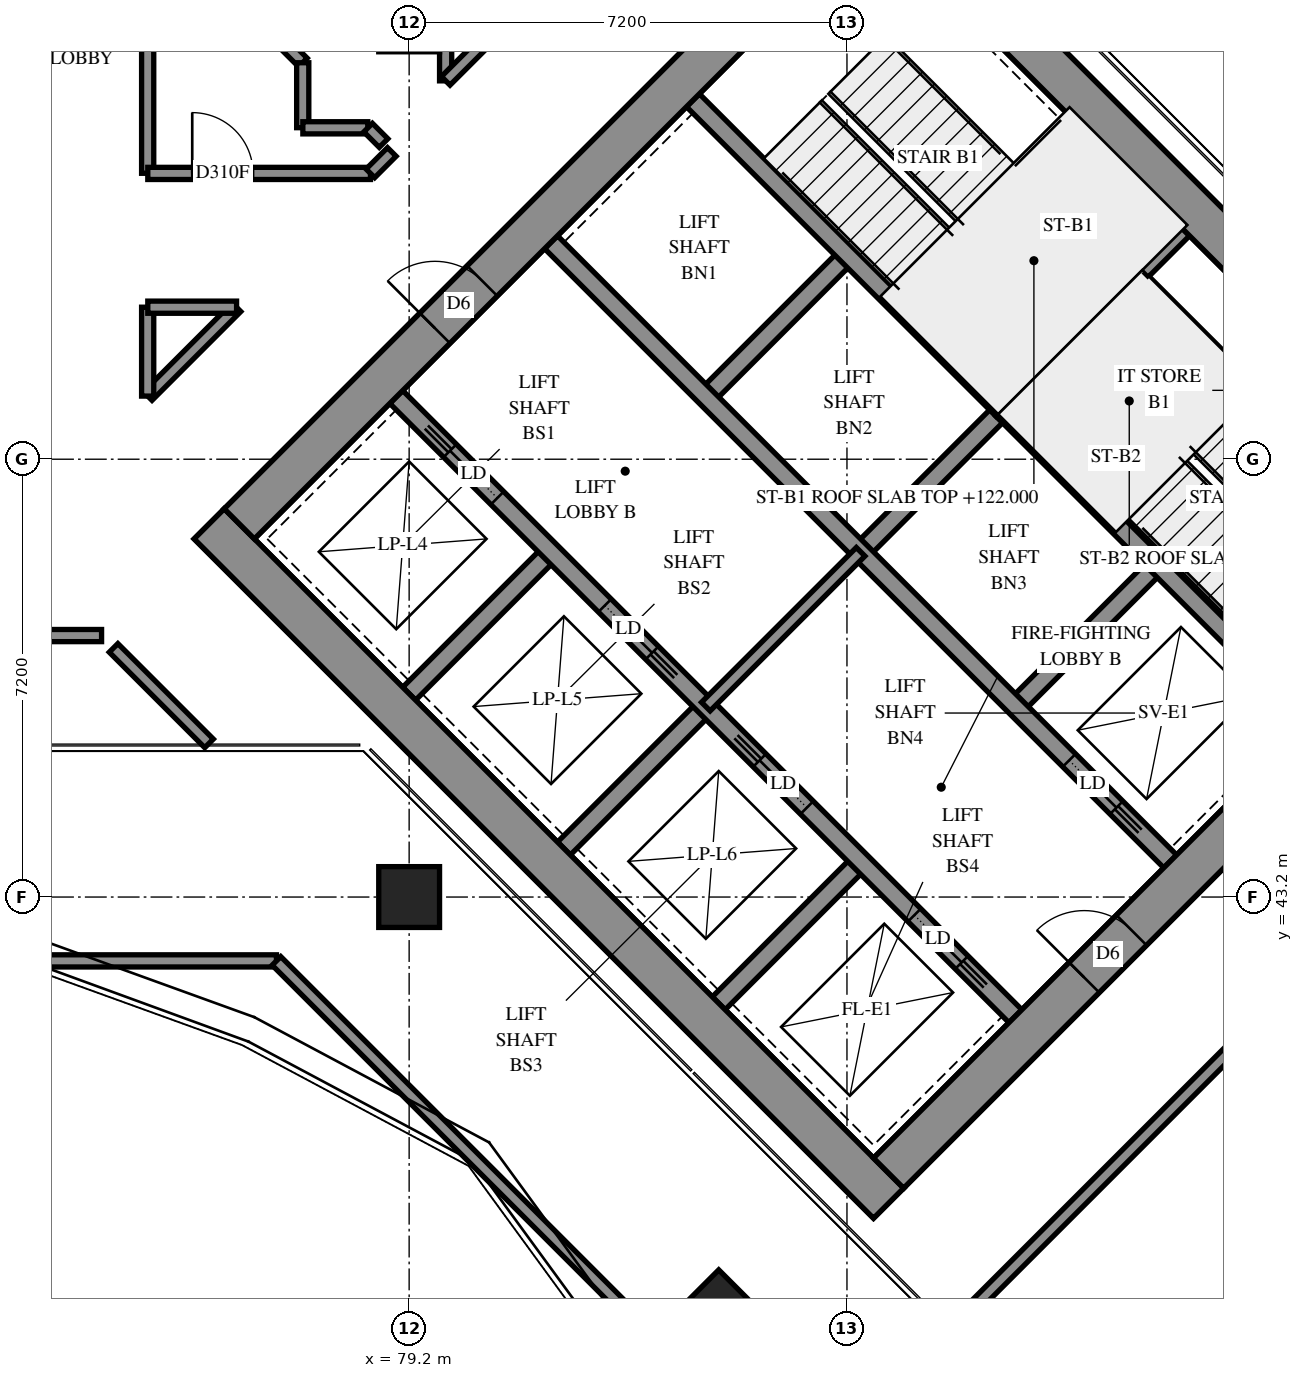
"""IFC4 building model, lengths in metres.
Left out: names, types, materials, properties, quantities, classifications, styles, units other than length and angle.
Written with IfcOpenShell. Run it as: python <this file> out.ifc"""

import sys

from ifc_helpers import new_model, si_unit, direction, frame, frame_2d, origin, origin_2d, place, context, subcontext, project, spatial, polyline, rectangle, outline, extrude, element, fill, save


model = new_model("IFC4")
c1 = context("Model", 3, precision=1e-05, world=origin(), true_north=direction((0.0, 1.0)))
c2 = subcontext(c1, "Body", "Model", "MODEL_VIEW")
j1 = project(units=[si_unit("LENGTHUNIT", "METRE"), si_unit("PLANEANGLEUNIT", "RADIAN")], contexts=[c1])
p1 = place(None, origin())
s1 = spatial("IfcSite", under=j1, at=p1, CompositionType="ELEMENT")
p2 = place(p1, origin())
s2 = spatial("IfcBuilding", under=s1, at=p2, CompositionType="ELEMENT")
p3 = place(p2, frame((0.0, 0.0, 122.0)))
s3 = spatial("IfcBuildingStorey", under=s2, at=p3, CompositionType="ELEMENT", Elevation=122.0)
for number, where, z_axis, x_axis in (
    (1, (79.2, 43.2, 0.0), (0.0, 0.0, 1.0), (1.0, 0.0, 0.0)),
    (2, (84.291, 36.362, 0.0), (0.0, 0.0, 1.0), (0.707, -0.707, 0.0)),
):
    element("IfcColumn", number, at=place(p3, frame(where, z_axis=z_axis, x_axis=x_axis)), inside=s3, PredefinedType="COLUMN", context=c2, shape_type="SweptSolid", body=[
        extrude(rectangle(XDim=1.0, YDim=1.0, at=origin_2d()), origin(), (0.0, 0.0, 1.0), 3.9),
    ])
p4 = place(p3, frame((75.912, 49.337, -0.3), z_axis=(0.0, 0.0, 1.0), x_axis=(0.7071036166, -0.7071099457, 0.0)))
e3 = element("IfcWall", 3, at=p4, inside=s3, PredefinedType="SHEAR", context=c2, shape_type="SweptSolid", body=[
    extrude(rectangle(XDim=15.8, YDim=0.7, at=frame_2d((7.9, 0.0))), origin(), (0.0, 0.0, 1.0), 3.5),
])
p5 = place(p3, frame((86.589, 60.014, -0.3), z_axis=(0.0, 0.0, 1.0), x_axis=(0.7071099457, -0.7071036166, 0.0)))
e4 = element("IfcWall", 4, at=p5, inside=s3, PredefinedType="SHEAR", context=c2, shape_type="SweptSolid", body=[
    extrude(rectangle(XDim=15.8, YDim=0.7, at=frame_2d((7.9, 0.0))), origin(), (0.0, 0.0, 1.0), 3.5),
])
p6 = place(p5, frame((10.7, 0.0, 0.3)))
e5 = element("IfcOpeningElement", 5, at=p6, cuts=e4, PredefinedType="OPENING", context=c2, shape_type="SweptSolid", body=[
    extrude(rectangle(XDim=0.8, YDim=2.1, at=frame_2d((0.4, 1.05))), frame((0.0, 0.36, 0.0), z_axis=(0.0, -1.0, 0.0), x_axis=(1.0, 0.0, 0.0)), (0.0, 0.0, 1.0), 0.72),
])
p7 = place(p3, frame((76.407, 49.337, -0.3), z_axis=(0.0, 0.0, 1.0), x_axis=(0.7071067812, 0.7071067812, 0.0)))
e6 = element("IfcWall", 6, at=p7, inside=s3, PredefinedType="SHEAR", context=c2, shape_type="SweptSolid", body=[
    extrude(rectangle(XDim=14.4, YDim=0.7, at=frame_2d((7.2, 0.0))), origin(), (0.0, 0.0, 1.0), 3.5),
])
p8 = place(p7, frame((4.55, 0.0, 0.3)))
e7 = element("IfcOpeningElement", 7, at=p8, cuts=e6, PredefinedType="OPENING", context=c2, shape_type="SweptSolid", body=[
    extrude(rectangle(XDim=1.1, YDim=2.1, at=frame_2d((0.55, 1.05))), frame((0.0, 0.36, 0.0), z_axis=(0.0, -1.0, 0.0), x_axis=(1.0, 0.0, 0.0)), (0.0, 0.0, 1.0), 0.72),
])
p9 = place(p7, frame((11.35, 0.0, 0.3)))
e8 = element("IfcOpeningElement", 8, at=p9, cuts=e6, PredefinedType="OPENING", context=c2, shape_type="SweptSolid", body=[
    extrude(rectangle(XDim=1.1, YDim=2.1, at=frame_2d((0.55, 1.05))), frame((0.0, 0.36, 0.0), z_axis=(0.0, -1.0, 0.0), x_axis=(1.0, 0.0, 0.0)), (0.0, 0.0, 1.0), 0.72),
])
p10 = place(p3, frame((87.084, 38.66, -0.3), z_axis=(0.0, 0.0, 1.0), x_axis=(0.7071067812, 0.7071067812, 0.0)))
e9 = element("IfcWall", 9, at=p10, inside=s3, PredefinedType="SHEAR", context=c2, shape_type="SweptSolid", body=[
    extrude(rectangle(XDim=14.4, YDim=0.7, at=frame_2d((7.2, 0.0))), origin(), (0.0, 0.0, 1.0), 3.5),
])
p11 = place(p10, frame((4.55, 0.0, 0.3)))
e10 = element("IfcOpeningElement", 10, at=p11, cuts=e9, PredefinedType="OPENING", context=c2, shape_type="SweptSolid", body=[
    extrude(rectangle(XDim=1.1, YDim=2.1, at=frame_2d((0.55, 1.05))), frame((0.0, 0.36, 0.0), z_axis=(0.0, -1.0, 0.0), x_axis=(1.0, 0.0, 0.0)), (0.0, 0.0, 1.0), 0.72),
])
p12 = place(p10, frame((11.35, 0.0, 0.3)))
e11 = element("IfcOpeningElement", 11, at=p12, cuts=e9, PredefinedType="OPENING", context=c2, shape_type="SweptSolid", body=[
    extrude(rectangle(XDim=1.1, YDim=2.1, at=frame_2d((0.55, 1.05))), frame((0.0, 0.36, 0.0), z_axis=(0.0, -1.0, 0.0), x_axis=(1.0, 0.0, 0.0)), (0.0, 0.0, 1.0), 0.72),
])
for number, where, z_axis, x_axis in (
    (12, (79.2, 46.544, 0.0), (0.0, 0.0, 1.0), (0.707, 0.707, 0.0)),
    (13, (84.079, 51.423, 0.0), (0.0, 0.0, 1.0), (0.707, 0.707, 0.0)),
):
    element("IfcWall", number, at=place(p3, frame(where, z_axis=z_axis, x_axis=x_axis)), inside=s3, PredefinedType="SOLIDWALL", context=c2, shape_type="SweptSolid", body=[
        extrude(rectangle(XDim=3.3, YDim=0.3, at=frame_2d((1.65, 0.0))), origin(), (0.0, 0.0, 1.0), 3.9),
    ])
p13 = place(p3, frame((81.746, 43.999, 0.0), z_axis=(0.0, 0.0, 1.0), x_axis=(0.7071067812, 0.7071067812, 0.0)))
e14 = element("IfcWall", 14, at=p13, inside=s3, PredefinedType="SOLIDWALL", context=c2, shape_type="SweptSolid", body=[
    extrude(rectangle(XDim=3.3, YDim=0.3, at=frame_2d((1.65, 0.0))), origin(), (0.0, 0.0, 1.0), 3.9),
])
p14 = place(p3, frame((86.625, 48.878, 0.0), z_axis=(0.0, 0.0, 1.0), x_axis=(0.7071067812, 0.7071067812, 0.0)))
e15 = element("IfcWall", 15, at=p14, inside=s3, PredefinedType="SOLIDWALL", context=c2, shape_type="SweptSolid", body=[
    extrude(rectangle(XDim=3.3, YDim=0.3, at=frame_2d((1.65, 0.0))), origin(), (0.0, 0.0, 1.0), 3.9),
])
p15 = place(p3, frame((84.291, 41.453, 0.0), z_axis=(0.0, 0.0, 1.0), x_axis=(0.7071067812, 0.7071067812, 0.0)))
e16 = element("IfcWall", 16, at=p15, inside=s3, PredefinedType="SOLIDWALL", context=c2, shape_type="SweptSolid", body=[
    extrude(rectangle(XDim=3.3, YDim=0.3, at=frame_2d((1.65, 0.0))), origin(), (0.0, 0.0, 1.0), 3.9),
])
p16 = place(p3, frame((89.17, 46.332, 0.0), z_axis=(0.0, 0.0, 1.0), x_axis=(0.7071067812, 0.7071067812, 0.0)))
e17 = element("IfcWall", 17, at=p16, inside=s3, PredefinedType="SOLIDWALL", context=c2, shape_type="SweptSolid", body=[
    extrude(rectangle(XDim=3.3, YDim=0.3, at=frame_2d((1.65, 0.0))), origin(), (0.0, 0.0, 1.0), 3.9),
])
p17 = place(p3, frame((78.988, 51.423, 0.0), z_axis=(0.0, 0.0, 1.0), x_axis=(0.7071067812, -0.7071067812, 0.0)))
e18 = element("IfcWall", 18, at=p17, inside=s3, PredefinedType="SOLIDWALL", context=c2, shape_type="SweptSolid", body=[
    extrude(rectangle(XDim=14.4, YDim=0.3, at=frame_2d((7.2, 0.0))), origin(), (0.0, 0.0, 1.0), 3.9),
])
p18 = place(p17, frame((1.25, 0.0, 0.0)))
e19 = element("IfcOpeningElement", 19, at=p18, cuts=e18, PredefinedType="OPENING", context=c2, shape_type="SweptSolid", body=[
    extrude(rectangle(XDim=1.1, YDim=2.1, at=frame_2d((0.55, 1.05))), frame((0.0, 0.16, 0.0), z_axis=(0.0, -1.0, 0.0), x_axis=(1.0, 0.0, 0.0)), (0.0, 0.0, 1.0), 0.32),
])
p19 = place(p17, frame((4.85, 0.0, 0.0)))
e20 = element("IfcOpeningElement", 20, at=p19, cuts=e18, PredefinedType="OPENING", context=c2, shape_type="SweptSolid", body=[
    extrude(rectangle(XDim=1.1, YDim=2.1, at=frame_2d((0.55, 1.05))), frame((0.0, 0.16, 0.0), z_axis=(0.0, -1.0, 0.0), x_axis=(1.0, 0.0, 0.0)), (0.0, 0.0, 1.0), 0.32),
])
p20 = place(p17, frame((8.45, 0.0, 0.0)))
e21 = element("IfcOpeningElement", 21, at=p20, cuts=e18, PredefinedType="OPENING", context=c2, shape_type="SweptSolid", body=[
    extrude(rectangle(XDim=1.1, YDim=2.1, at=frame_2d((0.55, 1.05))), frame((0.0, 0.16, 0.0), z_axis=(0.0, -1.0, 0.0), x_axis=(1.0, 0.0, 0.0)), (0.0, 0.0, 1.0), 0.32),
])
p21 = place(p17, frame((12.05, 0.0, 0.0)))
e22 = element("IfcOpeningElement", 22, at=p21, cuts=e18, PredefinedType="OPENING", context=c2, shape_type="SweptSolid", body=[
    extrude(rectangle(XDim=1.1, YDim=2.1, at=frame_2d((0.55, 1.05))), frame((0.0, 0.16, 0.0), z_axis=(0.0, -1.0, 0.0), x_axis=(1.0, 0.0, 0.0)), (0.0, 0.0, 1.0), 0.32),
])
p22 = place(p3, frame((81.534, 53.969, 0.0), z_axis=(0.0, 0.0, 1.0), x_axis=(0.707103309, -0.7071102534, 0.0)))
e23 = element("IfcWall", 23, at=p22, inside=s3, PredefinedType="SOLIDWALL", context=c2, shape_type="SweptSolid", body=[
    extrude(rectangle(XDim=14.4, YDim=0.3, at=frame_2d((7.2, 0.0))), origin(), (0.0, 0.0, 1.0), 3.9),
])
p23 = place(p22, frame((12.05, 0.0, 0.0)))
e24 = element("IfcOpeningElement", 24, at=p23, cuts=e23, PredefinedType="OPENING", context=c2, shape_type="SweptSolid", body=[
    extrude(rectangle(XDim=1.1, YDim=2.1, at=frame_2d((0.55, 1.05))), frame((0.0, 0.16, 0.0), z_axis=(0.0, -1.0, 0.0), x_axis=(1.0, 0.0, 0.0)), (0.0, 0.0, 1.0), 0.32),
])
for number, where, z_axis, x_axis in (
    (25, (83.867, 56.302, 0.0), (0.0, 0.0, 1.0), (0.707, -0.707, 0.0)),
    (26, (88.958, 51.211, 0.0), (0.0, 0.0, 1.0), (0.707, -0.707, 0.0)),
):
    element("IfcWall", number, at=place(p3, frame(where, z_axis=z_axis, x_axis=x_axis)), inside=s3, PredefinedType="SOLIDWALL", context=c2, shape_type="SweptSolid", body=[
        extrude(rectangle(XDim=7.2, YDim=0.3, at=frame_2d((3.6, 0.0))), origin(), (0.0, 0.0, 1.0), 3.9),
    ])
p24 = place(p3, frame((88.958, 51.211, 0.0), z_axis=(0.0, 0.0, 1.0), x_axis=(0.7071067812, 0.7071067812, 0.0)))
e27 = element("IfcWall", 27, at=p24, inside=s3, PredefinedType="SOLIDWALL", context=c2, shape_type="SweptSolid", body=[
    extrude(rectangle(XDim=4.2, YDim=0.3, at=frame_2d((2.1, 0.0))), origin(), (0.0, 0.0, 1.0), 3.9),
])
p25 = place(p3, frame((107.838, 44.847, 0.0), z_axis=(0.0, 0.0, 1.0), x_axis=(-0.7071067812, 0.7071067812, 0.0)))
e28 = element("IfcWall", 28, at=p25, inside=s3, PredefinedType="SOLIDWALL", context=c2, shape_type="SweptSolid", body=[
    extrude(outline(polyline([(-0.1, -0.1), (39.926, -0.1), (39.843, 0.1), (0.1, 0.1), (-0.1, -0.1)])), origin(), (0.0, 0.0, 1.0), 4.2),
])
p26 = place(p3, frame((49.35, 42.15, 0.0), z_axis=(0.0, 0.0, 1.0), x_axis=(1.0, 0.0, 0.0)))
e29 = element("IfcWall", 29, at=p26, inside=s3, PredefinedType="SOLIDWALL", context=c2, shape_type="SweptSolid", body=[
    extrude(outline(polyline([(-0.1, -0.1), (27.627, -0.1), (27.709, 0.1), (0.1, 0.1), (-0.1, -0.1)])), origin(), (0.0, 0.0, 1.0), 4.2),
])
p27 = place(p3, frame((77.018, 42.15, 0.0), z_axis=(0.0, 0.0, 1.0), x_axis=(0.7071067812, -0.7071067812, 0.0)))
e30 = element("IfcWall", 30, at=p27, inside=s3, PredefinedType="SOLIDWALL", context=c2, shape_type="SweptSolid", body=[
    extrude(outline(polyline([(0.041, -0.1), (24.786, -0.1), (24.586, 0.1), (-0.041, 0.1), (0.041, -0.1)])), origin(), (0.0, 0.0, 1.0), 4.2),
])
p28 = place(p3, frame((91.313, 53.354, 0.0), z_axis=(0.0, 0.0, 1.0), x_axis=(0.7071147811, -0.7070987812, 0.0)))
e31 = element("IfcWall", 31, at=p28, inside=s3, PredefinedType="PARTITIONING", context=c2, shape_type="SweptSolid", body=[
    extrude(rectangle(XDim=6.25, YDim=0.15, at=frame_2d((3.125, 0.0))), origin(), (0.0, 0.0, 1.0), 3.9),
])
p29 = place(p3, frame((84.079, 46.332, 0.0), z_axis=(0.0, 0.0, 1.0), x_axis=(0.7071067812, 0.7071067812, 0.0)))
e32 = element("IfcWall", 32, at=p29, inside=s3, PredefinedType="PARTITIONING", context=c2, shape_type="SweptSolid", body=[
    extrude(rectangle(XDim=3.6, YDim=0.2, at=frame_2d((1.8, 0.0))), origin(), (0.0, 0.0, 1.0), 3.9),
])
p30 = place(p3, frame((54.7, 47.5, 0.0), z_axis=(0.0, 0.0, 1.0), x_axis=(1.0, 0.0, 0.0)))
e33 = element("IfcWall", 33, at=p30, inside=s3, PredefinedType="PARTITIONING", context=c2, shape_type="SweptSolid", body=[
    extrude(rectangle(XDim=19.442, YDim=0.2, at=frame_2d((9.721, 0.0))), origin(), (0.0, 0.0, 1.0), 3.9),
])
p31 = place(p30, frame((12.444, 0.0, 0.0)))
e34 = element("IfcOpeningElement", 34, at=p31, cuts=e33, PredefinedType="OPENING", context=c2, shape_type="SweptSolid", body=[
    extrude(rectangle(XDim=1.0, YDim=2.1, at=frame_2d((0.5, 1.05))), frame((0.0, 0.11, 0.0), z_axis=(0.0, -1.0, 0.0), x_axis=(1.0, 0.0, 0.0)), (0.0, 0.0, 1.0), 0.22),
])
p32 = place(p3, frame((88.129, 36.1, 0.0), z_axis=(0.0, 0.0, 1.0), x_axis=(0.7071067812, 0.7071067812, 0.0)))
e35 = element("IfcWall", 35, at=p32, inside=s3, PredefinedType="PARTITIONING", context=c2, shape_type="SweptSolid", body=[
    extrude(rectangle(XDim=7.17, YDim=0.2, at=frame_2d((3.585, 0.0))), origin(), (0.0, 0.0, 1.0), 3.9),
])
p33 = place(p3, frame((74.9, 55.102, 0.0), z_axis=(0.0, 0.0, 1.0), x_axis=(0.0, 1.0, 0.0)))
e36 = element("IfcWall", 36, at=p33, inside=s3, PredefinedType="PARTITIONING", context=c2, shape_type="SweptSolid", body=[
    extrude(rectangle(XDim=4.366, YDim=0.2, at=frame_2d((2.183, 0.0))), origin(), (0.0, 0.0, 1.0), 3.9),
])
p34 = place(p3, frame((74.902, 55.1, 0.0), z_axis=(0.0, 0.0, 1.0), x_axis=(1.0, 0.0, 0.0)))
e37 = element("IfcWall", 37, at=p34, inside=s3, PredefinedType="PARTITIONING", context=c2, shape_type="SweptSolid", body=[
    extrude(rectangle(XDim=3.662, YDim=0.2, at=frame_2d((1.831, 0.0))), origin(), (0.0, 0.0, 1.0), 3.9),
])
p35 = place(p34, frame((0.731, 0.0, 0.0)))
e38 = element("IfcOpeningElement", 38, at=p35, cuts=e37, PredefinedType="OPENING", context=c2, shape_type="SweptSolid", body=[
    extrude(rectangle(XDim=1.0, YDim=2.1, at=frame_2d((0.5, 1.05))), frame((0.0, 0.11, 0.0), z_axis=(0.0, -1.0, 0.0), x_axis=(1.0, 0.0, 0.0)), (0.0, 0.0, 1.0), 0.22),
])
p36 = place(p3, frame((79.8, 56.622, 0.0), z_axis=(0.0, 0.0, 1.0), x_axis=(0.0, 1.0, 0.0)))
e39 = element("IfcWall", 39, at=p36, inside=s3, PredefinedType="PARTITIONING", context=c2, shape_type="SweptSolid", body=[
    extrude(rectangle(XDim=2.728, YDim=0.2, at=frame_2d((1.364, 0.0))), origin(), (0.0, 0.0, 1.0), 3.9),
])
p37 = place(p3, frame((75.879, 58.497, 0.0), z_axis=(0.0, 0.0, 1.0), x_axis=(0.7075561657, -0.7066571109, 0.0)))
e40 = element("IfcWall", 40, at=p37, inside=s3, PredefinedType="PARTITIONING", context=c2, shape_type="SweptSolid", body=[
    extrude(rectangle(XDim=2.225, YDim=0.2, at=frame_2d((1.112, 0.0))), origin(), (0.0, 0.0, 1.0), 3.9),
])
p38 = place(p3, frame((74.339, 47.297, 0.0), z_axis=(0.0, 0.0, 1.0), x_axis=(0.7071067812, -0.7071067812, 0.0)))
e41 = element("IfcWall", 41, at=p38, inside=s3, PredefinedType="PARTITIONING", context=c2, shape_type="SweptSolid", body=[
    extrude(rectangle(XDim=2.22, YDim=0.2, at=frame_2d((1.11, 0.0))), origin(), (0.0, 0.0, 1.0), 3.9),
])
p39 = place(p3, frame((74.901, 51.439, 0.0), z_axis=(0.0, 0.0, 1.0), x_axis=(0.7071067812, 0.7071067812, 0.0)))
e42 = element("IfcWall", 42, at=p39, inside=s3, PredefinedType="PARTITIONING", context=c2, shape_type="SweptSolid", body=[
    extrude(rectangle(XDim=2.065, YDim=0.2, at=frame_2d((1.032, 0.0))), origin(), (0.0, 0.0, 1.0), 3.9),
])
p40 = place(p3, frame((79.802, 56.623, 0.0), z_axis=(0.0, 0.0, 1.0), x_axis=(0.7071067812, 0.7071067812, 0.0)))
e43 = element("IfcWall", 43, at=p40, inside=s3, PredefinedType="PARTITIONING", context=c2, shape_type="SweptSolid", body=[
    extrude(rectangle(XDim=1.623, YDim=0.2, at=frame_2d((0.812, 0.0))), origin(), (0.0, 0.0, 1.0), 3.9),
])
p41 = place(p3, frame((74.9, 51.438, 0.0), z_axis=(0.0, 0.0, 1.0), x_axis=(0.0, 1.0, 0.0)))
e44 = element("IfcWall", 44, at=p41, inside=s3, PredefinedType="PARTITIONING", context=c2, shape_type="SweptSolid", body=[
    extrude(rectangle(XDim=1.462, YDim=0.2, at=frame_2d((0.731, 0.0))), origin(), (0.0, 0.0, 1.0), 3.9),
])
p42 = place(p3, frame((74.902, 52.9, 0.0), z_axis=(0.0, 0.0, 1.0), x_axis=(1.0, 0.0, 0.0)))
e45 = element("IfcWall", 45, at=p42, inside=s3, PredefinedType="PARTITIONING", context=c2, shape_type="SweptSolid", body=[
    extrude(rectangle(XDim=1.46, YDim=0.2, at=frame_2d((0.73, 0.0))), origin(), (0.0, 0.0, 1.0), 3.9),
])
for number, where, z_axis, x_axis in (
    (46, (77.45, 55.852, 0.0), (0.0, 0.0, 1.0), (0.0, 1.0, 0.0)),
    (47, (77.452, 55.85, 0.0), (0.0, 0.0, 1.0), (1.0, 0.0, 0.0)),
):
    element("IfcWall", number, at=place(p3, frame(where, z_axis=z_axis, x_axis=x_axis)), inside=s3, PredefinedType="PARTITIONING", context=c2, shape_type="SweptSolid", body=[
        extrude(rectangle(XDim=1.068, YDim=0.2, at=frame_2d((0.534, 0.0))), origin(), (0.0, 0.0, 1.0), 3.9),
    ])
p43 = place(p3, frame((78.563, 55.101, 0.0), z_axis=(0.0, 0.0, 1.0), x_axis=(0.7071067812, 0.7071067812, 0.0)))
e48 = element("IfcWall", 48, at=p43, inside=s3, PredefinedType="PARTITIONING", context=c2, shape_type="SweptSolid", body=[
    extrude(rectangle(XDim=0.498, YDim=0.2, at=frame_2d((0.249, 0.0))), origin(), (0.0, 0.0, 1.0), 3.9),
])
p44 = place(p3, frame((78.525, 55.853, 0.0), z_axis=(0.0, 0.0, 1.0), x_axis=(0.7071067812, -0.7071067812, 0.0)))
e49 = element("IfcWall", 49, at=p44, inside=s3, PredefinedType="PARTITIONING", context=c2, shape_type="SweptSolid", body=[
    extrude(rectangle(XDim=0.359, YDim=0.2, at=frame_2d((0.18, 0.0))), origin(), (0.0, 0.0, 1.0), 3.9),
])
p45 = place(p8, origin())
e50 = element("IfcDoor", 50, at=p45, inside=s3, OperationType="DOUBLE_DOOR_SINGLE_SWING", PredefinedType="DOOR", context=c2, shape_type="SweptSolid", body=[
    extrude(rectangle(XDim=1.1, YDim=2.1, at=frame_2d((0.55, 1.05))), frame((0.0, 0.025, 0.0), z_axis=(0.0, -1.0, 0.0), x_axis=(1.0, 0.0, 0.0)), (0.0, 0.0, 1.0), 0.05),
])
fill(e7, e50)
p46 = place(p11, origin())
e51 = element("IfcDoor", 51, at=p46, inside=s3, OperationType="DOUBLE_DOOR_SINGLE_SWING", PredefinedType="DOOR", context=c2, shape_type="SweptSolid", body=[
    extrude(rectangle(XDim=1.1, YDim=2.1, at=frame_2d((0.55, 1.05))), frame((0.0, 0.025, 0.0), z_axis=(0.0, -1.0, 0.0), x_axis=(1.0, 0.0, 0.0)), (0.0, 0.0, 1.0), 0.05),
])
fill(e10, e51)
p47 = place(p18, origin())
e52 = element("IfcDoor", 52, at=p47, inside=s3, OperationType="SLIDING_TO_LEFT", PredefinedType="DOOR", context=c2, shape_type="SweptSolid", body=[
    extrude(rectangle(XDim=1.1, YDim=2.1, at=frame_2d((0.55, 1.05))), frame((0.0, 0.025, 0.0), z_axis=(0.0, -1.0, 0.0), x_axis=(1.0, 0.0, 0.0)), (0.0, 0.0, 1.0), 0.05),
])
fill(e19, e52)
p48 = place(p19, origin())
e53 = element("IfcDoor", 53, at=p48, inside=s3, OperationType="SLIDING_TO_RIGHT", PredefinedType="DOOR", context=c2, shape_type="SweptSolid", body=[
    extrude(rectangle(XDim=1.1, YDim=2.1, at=frame_2d((0.55, 1.05))), frame((0.0, 0.025, 0.0), z_axis=(0.0, -1.0, 0.0), x_axis=(1.0, 0.0, 0.0)), (0.0, 0.0, 1.0), 0.05),
])
fill(e20, e53)
p49 = place(p20, origin())
e54 = element("IfcDoor", 54, at=p49, inside=s3, OperationType="SLIDING_TO_LEFT", PredefinedType="DOOR", context=c2, shape_type="SweptSolid", body=[
    extrude(rectangle(XDim=1.1, YDim=2.1, at=frame_2d((0.55, 1.05))), frame((0.0, 0.025, 0.0), z_axis=(0.0, -1.0, 0.0), x_axis=(1.0, 0.0, 0.0)), (0.0, 0.0, 1.0), 0.05),
])
fill(e21, e54)
p50 = place(p21, origin())
e55 = element("IfcDoor", 55, at=p50, inside=s3, OperationType="SLIDING_TO_RIGHT", PredefinedType="DOOR", context=c2, shape_type="SweptSolid", body=[
    extrude(rectangle(XDim=1.1, YDim=2.1, at=frame_2d((0.55, 1.05))), frame((0.0, 0.025, 0.0), z_axis=(0.0, -1.0, 0.0), x_axis=(1.0, 0.0, 0.0)), (0.0, 0.0, 1.0), 0.05),
])
fill(e22, e55)
p51 = place(p23, origin())
e56 = element("IfcDoor", 56, at=p51, inside=s3, OperationType="SLIDING_TO_RIGHT", PredefinedType="DOOR", context=c2, shape_type="SweptSolid", body=[
    extrude(rectangle(XDim=1.1, YDim=2.1, at=frame_2d((0.55, 1.05))), frame((0.0, 0.025, 0.0), z_axis=(0.0, -1.0, 0.0), x_axis=(1.0, 0.0, 0.0)), (0.0, 0.0, 1.0), 0.05),
])
fill(e24, e56)
p52 = place(p35, origin())
e57 = element("IfcDoor", 57, at=p52, inside=s3, OperationType="SINGLE_SWING_LEFT", PredefinedType="DOOR", context=c2, shape_type="SweptSolid", body=[
    extrude(rectangle(XDim=1.0, YDim=2.1, at=frame_2d((0.5, 1.05))), frame((0.0, 0.025, 0.0), z_axis=(0.0, -1.0, 0.0), x_axis=(1.0, 0.0, 0.0)), (0.0, 0.0, 1.0), 0.05),
])
fill(e38, e57)
save(model, sys.argv[1])
